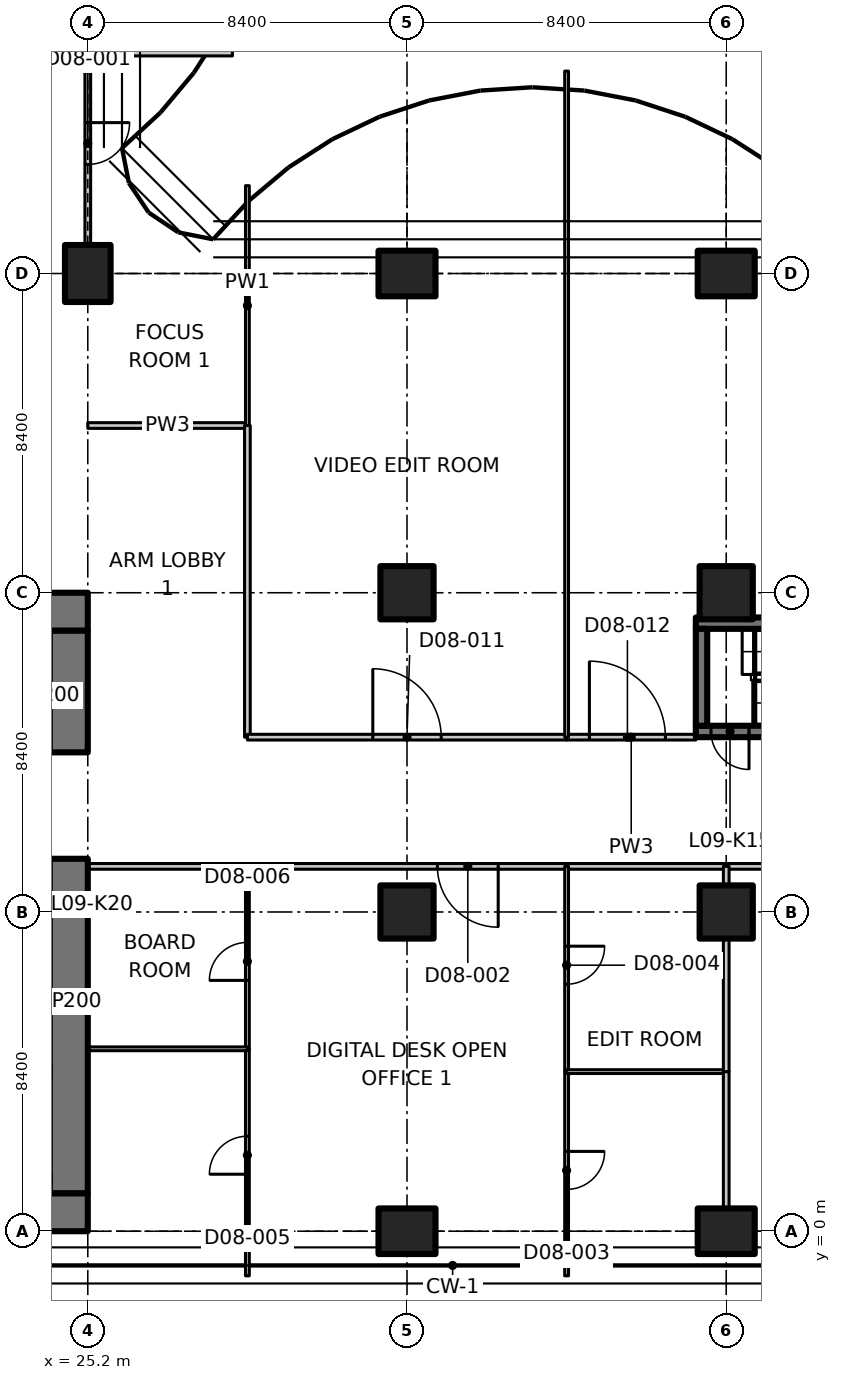
"""IFC4 building model, lengths in metres.
Left out: names, types, materials, properties, quantities, classifications, styles, units other than length and angle.
Written with IfcOpenShell. Run it as: python <this file> out.ifc"""

import sys

from ifc_helpers import new_model, si_unit, direction, frame, frame_2d, origin, origin_2d, place, context, subcontext, project, spatial, polyline, rectangle, outline, extrude, element, fill, save


model = new_model("IFC4")
c1 = context("Model", 3, precision=1e-05, world=origin(), true_north=direction((0.0, 1.0)))
c2 = subcontext(c1, "Body", "Model", "MODEL_VIEW")
j1 = project(units=[si_unit("LENGTHUNIT", "METRE"), si_unit("PLANEANGLEUNIT", "RADIAN")], contexts=[c1])
p1 = place(None, origin())
s1 = spatial("IfcSite", under=j1, at=p1, CompositionType="ELEMENT")
p2 = place(p1, origin())
s2 = spatial("IfcBuilding", under=s1, at=p2, CompositionType="ELEMENT")
p3 = place(p2, frame((0.0, 0.0, 47.3)))
s3 = spatial("IfcBuildingStorey", under=s2, at=p3, CompositionType="ELEMENT", Elevation=47.3)
for number, where, z_axis, x_axis in (
    (1, (25.2, 25.2, 0.0), (0.0, 0.0, 1.0), (1.0, 0.0, 0.0)),
    (2, (33.6, 0.0, 0.0), (0.0, 0.0, 1.0), (0.0, 1.0, 0.0)),
):
    element("IfcColumn", number, at=place(p3, frame(where, z_axis=z_axis, x_axis=x_axis)), inside=s3, PredefinedType="COLUMN", context=c2, shape_type="SweptSolid", body=[
        extrude(rectangle(XDim=1.2, YDim=1.5, at=origin_2d()), origin(), (0.0, 0.0, 1.0), 3.35),
    ])
for number, where, z_axis, x_axis in (
    (3, (33.6, 8.4, 0.0), (0.0, 0.0, 1.0), (1.0, 0.0, 0.0)),
    (4, (33.6, 16.8, 0.0), (0.0, 0.0, 1.0), (1.0, 0.0, 0.0)),
):
    element("IfcColumn", number, at=place(p3, frame(where, z_axis=z_axis, x_axis=x_axis)), inside=s3, PredefinedType="COLUMN", context=c2, shape_type="SweptSolid", body=[
        extrude(rectangle(XDim=1.4, YDim=1.4, at=origin_2d()), origin(), (0.0, 0.0, 1.0), 3.35),
    ])
for number, where, z_axis, x_axis in (
    (5, (33.6, 25.2, 0.0), (0.0, 0.0, 1.0), (0.0, 1.0, 0.0)),
    (6, (42.0, 0.0, 0.0), (0.0, 0.0, 1.0), (0.0, 1.0, 0.0)),
):
    element("IfcColumn", number, at=place(p3, frame(where, z_axis=z_axis, x_axis=x_axis)), inside=s3, PredefinedType="COLUMN", context=c2, shape_type="SweptSolid", body=[
        extrude(rectangle(XDim=1.2, YDim=1.5, at=origin_2d()), origin(), (0.0, 0.0, 1.0), 3.35),
    ])
for number, where, z_axis, x_axis in (
    (7, (42.0, 8.4, 0.0), (0.0, 0.0, 1.0), (1.0, 0.0, 0.0)),
    (8, (42.0, 16.8, 0.0), (0.0, 0.0, 1.0), (1.0, 0.0, 0.0)),
):
    element("IfcColumn", number, at=place(p3, frame(where, z_axis=z_axis, x_axis=x_axis)), inside=s3, PredefinedType="COLUMN", context=c2, shape_type="SweptSolid", body=[
        extrude(rectangle(XDim=1.4, YDim=1.4, at=origin_2d()), origin(), (0.0, 0.0, 1.0), 3.35),
    ])
p4 = place(p3, frame((42.0, 25.2, 0.0), z_axis=(0.0, 0.0, 1.0), x_axis=(0.0, 1.0, 0.0)))
e9 = element("IfcColumn", 9, at=p4, inside=s3, PredefinedType="COLUMN", context=c2, shape_type="SweptSolid", body=[
    extrude(rectangle(XDim=1.2, YDim=1.5, at=origin_2d()), origin(), (0.0, 0.0, 1.0), 3.35),
])
p5 = place(p3, frame((6.936, 0.5, 0.0), z_axis=(0.0, 0.0, 1.0), x_axis=(1.0, 0.0, 0.0)))
e10 = element("IfcWall", 10, at=p5, inside=s3, PredefinedType="SHEAR", context=c2, shape_type="SweptSolid", body=[
    extrude(rectangle(XDim=18.264, YDim=1.0, at=frame_2d((9.132, 0.0))), origin(), (0.0, 0.0, 1.0), 3.35),
])
p6 = place(p3, frame((23.8, 16.3, 0.0), z_axis=(0.0, 0.0, 1.0), x_axis=(1.0, 0.0, 0.0)))
e11 = element("IfcWall", 11, at=p6, inside=s3, PredefinedType="SHEAR", context=c2, shape_type="SweptSolid", body=[
    extrude(rectangle(XDim=1.4, YDim=1.0, at=frame_2d((0.7, 0.0))), origin(), (0.0, 0.0, 1.0), 3.35),
])
p7 = place(p3, frame((24.7, 1.0, 0.0), z_axis=(0.0, 0.0, 1.0), x_axis=(0.0, 1.0, 0.0)))
e12 = element("IfcWall", 12, at=p7, inside=s3, PredefinedType="SHEAR", context=c2, shape_type="SweptSolid", body=[
    extrude(rectangle(XDim=8.8, YDim=1.0, at=frame_2d((4.4, 0.0))), origin(), (0.0, 0.0, 1.0), 3.35),
])
p8 = place(p3, frame((24.7, 12.6, 0.0), z_axis=(0.0, 0.0, 1.0), x_axis=(0.0, 1.0, 0.0)))
e13 = element("IfcWall", 13, at=p8, inside=s3, PredefinedType="SHEAR", context=c2, shape_type="SweptSolid", body=[
    extrude(rectangle(XDim=3.2, YDim=1.0, at=frame_2d((1.6, 0.0))), origin(), (0.0, 0.0, 1.0), 3.35),
])
p9 = place(p3, frame((49.4, 13.15, 0.0), z_axis=(0.0, 0.0, 1.0), x_axis=(-1.0, 0.0, 0.0)))
e14 = element("IfcWall", 14, at=p9, inside=s3, PredefinedType="SHEAR", context=c2, shape_type="SweptSolid", body=[
    extrude(rectangle(XDim=8.2, YDim=0.3, at=frame_2d((4.1, 0.0))), origin(), (0.0, 0.0, 1.0), 3.35),
])
p10 = place(p9, frame((6.8, 0.0, 0.0)))
e15 = element("IfcOpeningElement", 15, at=p10, cuts=e14, PredefinedType="OPENING", context=c2, shape_type="SweptSolid", body=[
    extrude(rectangle(XDim=1.0, YDim=2.1, at=frame_2d((0.5, 1.05))), frame((0.0, 0.16, 0.0), z_axis=(0.0, -1.0, 0.0), x_axis=(1.0, 0.0, 0.0)), (0.0, 0.0, 1.0), 0.32),
])
p11 = place(p3, frame((41.2, 16.0, 0.0), z_axis=(0.0, 0.0, 1.0), x_axis=(1.0, 0.0, 0.0)))
e16 = element("IfcWall", 16, at=p11, inside=s3, PredefinedType="SHEAR", context=c2, shape_type="SweptSolid", body=[
    extrude(rectangle(XDim=8.2, YDim=0.3, at=frame_2d((4.1, 0.0))), origin(), (0.0, 0.0, 1.0), 3.35),
])
p12 = place(p3, frame((41.35, 13.3, 0.0), z_axis=(0.0, 0.0, 1.0), x_axis=(0.0, 1.0, 0.0)))
e17 = element("IfcWall", 17, at=p12, inside=s3, PredefinedType="SHEAR", context=c2, shape_type="SweptSolid", body=[
    extrude(rectangle(XDim=2.55, YDim=0.3, at=frame_2d((1.275, 0.0))), origin(), (0.0, 0.0, 1.0), 3.35),
])
for number, where, z_axis, x_axis in (
    (18, (25.2, 21.2, 0.0), (0.0, 0.0, 1.0), (1.0, 0.0, 0.0)),
    (19, (29.4, 9.6, 0.0), (0.0, 0.0, 1.0), (-1.0, 0.0, 0.0)),
):
    element("IfcWall", number, at=place(p3, frame(where, z_axis=z_axis, x_axis=x_axis)), inside=s3, PredefinedType="PARTITIONING", context=c2, shape_type="SweptSolid", body=[
        extrude(rectangle(XDim=4.2, YDim=0.15, at=frame_2d((2.1, 0.0))), origin(), (0.0, 0.0, 1.0), 3.33),
    ])
p13 = place(p3, frame((29.4, 21.2, 0.0), z_axis=(0.0, 0.0, 1.0), x_axis=(0.0, -1.0, 0.0)))
e20 = element("IfcWall", 20, at=p13, inside=s3, PredefinedType="PARTITIONING", context=c2, shape_type="SweptSolid", body=[
    extrude(rectangle(XDim=8.2, YDim=0.15, at=frame_2d((4.1, 0.0))), origin(), (0.0, 0.0, 1.0), 3.33),
])
p14 = place(p3, frame((29.4, 27.511, 0.0), z_axis=(0.0, 0.0, 1.0), x_axis=(0.0, -1.0, 0.0)))
e21 = element("IfcWall", 21, at=p14, inside=s3, PredefinedType="PARTITIONING", context=c2, shape_type="SweptSolid", body=[
    extrude(outline(polyline([(0.0, 0.0), (6.311, 0.0), (6.311, 3.33), (2.761, 3.33), (2.759, 2.98), (1.863, 2.98), (1.861, 3.33), (0.236, 3.33), (0.0, 3.33), (0.0, 0.0)])), frame((0.0, 0.05, 0.0), z_axis=(0.0, -1.0, 0.0), x_axis=(1.0, 0.0, 0.0)), (0.0, 0.0, 1.0), 0.1),
])
p15 = place(p3, frame((25.2, 31.0, 0.0), z_axis=(0.0, 0.0, 1.0), x_axis=(0.0, -1.0, 0.0)))
e22 = element("IfcWall", 22, at=p15, inside=s3, PredefinedType="PARTITIONING", context=c2, shape_type="SweptSolid", body=[
    extrude(outline(polyline([(0.0, 0.0), (5.03, 0.0), (5.03, 2.98), (0.0, 2.98), (0.0, 0.0)])), frame((0.0, 0.075, 0.0), z_axis=(0.0, -1.0, 0.0), x_axis=(1.0, 0.0, 0.0)), (0.0, 0.0, 1.0), 0.15),
])
p16 = place(p15, frame((1.83, 0.0, 0.0)))
e23 = element("IfcOpeningElement", 23, at=p16, cuts=e22, PredefinedType="OPENING", context=c2, shape_type="SweptSolid", body=[
    extrude(rectangle(XDim=1.1, YDim=2.1, at=frame_2d((0.55, 1.05))), frame((0.0, 0.085, 0.0), z_axis=(0.0, -1.0, 0.0), x_axis=(1.0, 0.0, 0.0)), (0.0, 0.0, 1.0), 0.17),
])
p17 = place(p3, frame((25.2, 31.0, 0.0), z_axis=(0.0, 0.0, 1.0), x_axis=(1.0, 0.0, 0.0)))
e24 = element("IfcWall", 24, at=p17, inside=s3, PredefinedType="PARTITIONING", context=c2, shape_type="SweptSolid", body=[
    extrude(rectangle(XDim=3.806, YDim=0.15, at=frame_2d((1.903, 0.0))), origin(), (0.0, 0.0, 1.0), 2.98),
])
p18 = place(p3, frame((37.8, 9.6, 0.0), z_axis=(0.0, 0.0, 1.0), x_axis=(-1.0, 0.0, 0.0)))
e25 = element("IfcWall", 25, at=p18, inside=s3, PredefinedType="PARTITIONING", context=c2, shape_type="SweptSolid", body=[
    extrude(rectangle(XDim=8.4, YDim=0.15, at=frame_2d((4.2, 0.0))), origin(), (0.0, 0.0, 1.0), 3.33),
])
p19 = place(p18, frame((1.8, 0.0, 0.0)))
e26 = element("IfcOpeningElement", 26, at=p19, cuts=e25, PredefinedType="OPENING", context=c2, shape_type="SweptSolid", body=[
    extrude(rectangle(XDim=1.6, YDim=2.1, at=frame_2d((0.8, 1.05))), frame((0.0, 0.085, 0.0), z_axis=(0.0, -1.0, 0.0), x_axis=(1.0, 0.0, 0.0)), (0.0, 0.0, 1.0), 0.17),
])
p20 = place(p3, frame((42.0, 9.6, 0.0), z_axis=(0.0, 0.0, 1.0), x_axis=(-1.0, 0.0, 0.0)))
e27 = element("IfcWall", 27, at=p20, inside=s3, PredefinedType="PARTITIONING", context=c2, shape_type="SweptSolid", body=[
    extrude(rectangle(XDim=4.2, YDim=0.15, at=frame_2d((2.1, 0.0))), origin(), (0.0, 0.0, 1.0), 3.33),
])
p21 = place(p3, frame((54.6, 9.6, 0.0), z_axis=(0.0, 0.0, 1.0), x_axis=(-1.0, 0.0, 0.0)))
e28 = element("IfcWall", 28, at=p21, inside=s3, PredefinedType="PARTITIONING", context=c2, shape_type="SweptSolid", body=[
    extrude(rectangle(XDim=12.6, YDim=0.15, at=frame_2d((6.3, 0.0))), origin(), (0.0, 0.0, 1.0), 3.33),
])
p22 = place(p21, frame((5.4, 0.0, 0.0)))
e29 = element("IfcOpeningElement", 29, at=p22, cuts=e28, PredefinedType="OPENING", context=c2, shape_type="SweptSolid", body=[
    extrude(rectangle(XDim=1.8, YDim=2.1, at=frame_2d((0.9, 1.05))), frame((0.0, 0.085, 0.0), z_axis=(0.0, -1.0, 0.0), x_axis=(1.0, 0.0, 0.0)), (0.0, 0.0, 1.0), 0.17),
])
p23 = place(p3, frame((29.4, 13.0, 0.0), z_axis=(0.0, 0.0, 1.0), x_axis=(1.0, 0.0, 0.0)))
e30 = element("IfcWall", 30, at=p23, inside=s3, PredefinedType="PARTITIONING", context=c2, shape_type="SweptSolid", body=[
    extrude(rectangle(XDim=8.4, YDim=0.15, at=frame_2d((4.2, 0.0))), origin(), (0.0, 0.0, 1.0), 3.33),
])
p24 = place(p23, frame((3.3, 0.0, 0.0)))
e31 = element("IfcOpeningElement", 31, at=p24, cuts=e30, PredefinedType="OPENING", context=c2, shape_type="SweptSolid", body=[
    extrude(rectangle(XDim=1.8, YDim=2.1, at=frame_2d((0.9, 1.05))), frame((0.0, 0.085, 0.0), z_axis=(0.0, -1.0, 0.0), x_axis=(1.0, 0.0, 0.0)), (0.0, 0.0, 1.0), 0.17),
])
p25 = place(p3, frame((37.8, 13.0, 0.0), z_axis=(0.0, 0.0, 1.0), x_axis=(1.0, 0.0, 0.0)))
e32 = element("IfcWall", 32, at=p25, inside=s3, PredefinedType="PARTITIONING", context=c2, shape_type="SweptSolid", body=[
    extrude(rectangle(XDim=3.4, YDim=0.15, at=frame_2d((1.7, 0.0))), origin(), (0.0, 0.0, 1.0), 3.33),
])
p26 = place(p25, frame((0.6, 0.0, 0.0)))
e33 = element("IfcOpeningElement", 33, at=p26, cuts=e32, PredefinedType="OPENING", context=c2, shape_type="SweptSolid", body=[
    extrude(rectangle(XDim=2.0, YDim=2.4, at=frame_2d((1.0, 1.2))), frame((0.0, 0.085, 0.0), z_axis=(0.0, -1.0, 0.0), x_axis=(1.0, 0.0, 0.0)), (0.0, 0.0, 1.0), 0.17),
])
p27 = place(p3, frame((37.8, 4.2, 0.0), z_axis=(0.0, 0.0, 1.0), x_axis=(0.0, -1.0, 0.0)))
e34 = element("IfcWall", 34, at=p27, inside=s3, PredefinedType="PARTITIONING", context=c2, shape_type="SweptSolid", body=[
    extrude(outline(polyline([(0.0, 0.0), (5.374, 0.0), (5.374, 3.33), (5.3, 3.33), (4.65, 3.33), (4.648, 2.98), (3.752, 2.98), (3.75, 3.33), (0.0, 3.33), (0.0, 0.0)])), frame((0.0, 0.05, 0.0), z_axis=(0.0, -1.0, 0.0), x_axis=(1.0, 0.0, 0.0)), (0.0, 0.0, 1.0), 0.1),
])
p28 = place(p27, frame((2.1, 0.0, 0.0)))
e35 = element("IfcOpeningElement", 35, at=p28, cuts=e34, PredefinedType="OPENING", context=c2, shape_type="SweptSolid", body=[
    extrude(rectangle(XDim=1.0, YDim=2.1, at=frame_2d((0.5, 1.05))), frame((0.0, 0.06, 0.0), z_axis=(0.0, -1.0, 0.0), x_axis=(1.0, 0.0, 0.0)), (0.0, 0.0, 1.0), 0.12),
])
p29 = place(p3, frame((37.8, 9.6, 0.0), z_axis=(0.0, 0.0, 1.0), x_axis=(0.0, -1.0, 0.0)))
e36 = element("IfcWall", 36, at=p29, inside=s3, PredefinedType="PARTITIONING", context=c2, shape_type="SweptSolid", body=[
    extrude(rectangle(XDim=5.4, YDim=0.1, at=frame_2d((2.7, 0.0))), origin(), (0.0, 0.0, 1.0), 3.33),
])
p30 = place(p29, frame((2.1, 0.0, 0.0)))
e37 = element("IfcOpeningElement", 37, at=p30, cuts=e36, PredefinedType="OPENING", context=c2, shape_type="SweptSolid", body=[
    extrude(rectangle(XDim=1.0, YDim=2.1, at=frame_2d((0.5, 1.05))), frame((0.0, 0.06, 0.0), z_axis=(0.0, -1.0, 0.0), x_axis=(1.0, 0.0, 0.0)), (0.0, 0.0, 1.0), 0.12),
])
p31 = place(p3, frame((29.4, -1.174, 0.0), z_axis=(0.0, 0.0, 1.0), x_axis=(0.0, 1.0, 0.0)))
e38 = element("IfcWall", 38, at=p31, inside=s3, PredefinedType="PARTITIONING", context=c2, shape_type="SweptSolid", body=[
    extrude(outline(polyline([(0.0, 0.0), (5.974, 0.0), (5.974, 3.33), (1.624, 3.33), (1.622, 2.98), (0.726, 2.98), (0.724, 3.33), (0.074, 3.33), (0.0, 3.33), (0.0, 0.0)])), frame((0.0, 0.05, 0.0), z_axis=(0.0, -1.0, 0.0), x_axis=(1.0, 0.0, 0.0)), (0.0, 0.0, 1.0), 0.1),
])
p32 = place(p31, frame((2.674, 0.0, 0.0)))
e39 = element("IfcOpeningElement", 39, at=p32, cuts=e38, PredefinedType="OPENING", context=c2, shape_type="SweptSolid", body=[
    extrude(rectangle(XDim=1.0, YDim=2.1, at=frame_2d((0.5, 1.05))), frame((0.0, 0.06, 0.0), z_axis=(0.0, -1.0, 0.0), x_axis=(1.0, 0.0, 0.0)), (0.0, 0.0, 1.0), 0.12),
])
p33 = place(p3, frame((29.4, 4.8, 0.0), z_axis=(0.0, 0.0, 1.0), x_axis=(0.0, 1.0, 0.0)))
e40 = element("IfcWall", 40, at=p33, inside=s3, PredefinedType="PARTITIONING", context=c2, shape_type="SweptSolid", body=[
    extrude(rectangle(XDim=4.8, YDim=0.1, at=frame_2d((2.4, 0.0))), origin(), (0.0, 0.0, 1.0), 3.33),
])
p34 = place(p33, frame((1.8, 0.0, 0.0)))
e41 = element("IfcOpeningElement", 41, at=p34, cuts=e40, PredefinedType="OPENING", context=c2, shape_type="SweptSolid", body=[
    extrude(rectangle(XDim=1.0, YDim=2.1, at=frame_2d((0.5, 1.05))), frame((0.0, 0.06, 0.0), z_axis=(0.0, -1.0, 0.0), x_axis=(1.0, 0.0, 0.0)), (0.0, 0.0, 1.0), 0.12),
])
p35 = place(p3, frame((37.8, 4.2, 0.0), z_axis=(0.0, 0.0, 1.0), x_axis=(1.0, 0.0, 0.0)))
e42 = element("IfcWall", 42, at=p35, inside=s3, PredefinedType="PARTITIONING", context=c2, shape_type="SweptSolid", body=[
    extrude(rectangle(XDim=4.2, YDim=0.1, at=frame_2d((2.1, 0.0))), origin(), (0.0, 0.0, 1.0), 3.33),
])
p36 = place(p3, frame((42.0, 4.2, 0.0), z_axis=(0.0, 0.0, 1.0), x_axis=(0.0, -1.0, 0.0)))
e43 = element("IfcWall", 43, at=p36, inside=s3, PredefinedType="PARTITIONING", context=c2, shape_type="SweptSolid", body=[
    extrude(rectangle(XDim=3.58, YDim=0.15, at=frame_2d((1.79, 0.0))), origin(), (0.0, 0.0, 1.0), 3.33),
])
p37 = place(p3, frame((42.0, 9.6, 0.0), z_axis=(0.0, 0.0, 1.0), x_axis=(0.0, -1.0, 0.0)))
e44 = element("IfcWall", 44, at=p37, inside=s3, PredefinedType="PARTITIONING", context=c2, shape_type="SweptSolid", body=[
    extrude(rectangle(XDim=0.48, YDim=0.15, at=frame_2d((0.24, 0.0))), origin(), (0.0, 0.0, 1.0), 3.33),
])
p38 = place(p3, frame((42.0, 7.68, 0.0), z_axis=(0.0, 0.0, 1.0), x_axis=(0.0, -1.0, 0.0)))
e45 = element("IfcWall", 45, at=p38, inside=s3, PredefinedType="PARTITIONING", context=c2, shape_type="SweptSolid", body=[
    extrude(rectangle(XDim=3.48, YDim=0.15, at=frame_2d((1.74, 0.0))), origin(), (0.0, 0.0, 1.0), 3.33),
])
p39 = place(p3, frame((25.2, 4.8, 0.0), z_axis=(0.0, 0.0, 1.0), x_axis=(1.0, 0.0, 0.0)))
e46 = element("IfcWall", 46, at=p39, inside=s3, PredefinedType="PARTITIONING", context=c2, shape_type="SweptSolid", body=[
    extrude(rectangle(XDim=4.2, YDim=0.1, at=frame_2d((2.1, 0.0))), origin(), (0.0, 0.0, 1.0), 3.33),
])
p40 = place(p3, frame((37.8, 30.526, 0.0), z_axis=(0.0, 0.0, 1.0), x_axis=(0.0, -1.0, 0.0)))
e47 = element("IfcWall", 47, at=p40, inside=s3, PredefinedType="PARTITIONING", context=c2, shape_type="SweptSolid", body=[
    extrude(outline(polyline([(0.0, 0.0), (17.526, 0.0), (17.526, 3.33), (5.776, 3.33), (5.774, 2.98), (4.878, 2.98), (4.876, 3.33), (0.283, 3.33), (0.0, 3.33), (0.0, 0.0)])), frame((0.0, 0.05, 0.0), z_axis=(0.0, -1.0, 0.0), x_axis=(1.0, 0.0, 0.0)), (0.0, 0.0, 1.0), 0.1),
])
p41 = place(p10, origin())
e48 = element("IfcDoor", 48, at=p41, inside=s3, OperationType="SINGLE_SWING_RIGHT", PredefinedType="DOOR", context=c2, shape_type="SweptSolid", body=[
    extrude(rectangle(XDim=1.0, YDim=2.1, at=frame_2d((0.5, 1.05))), frame((0.0, 0.025, 0.0), z_axis=(0.0, -1.0, 0.0), x_axis=(1.0, 0.0, 0.0)), (0.0, 0.0, 1.0), 0.05),
])
fill(e15, e48)
p42 = place(p16, origin())
e49 = element("IfcDoor", 49, at=p42, inside=s3, OperationType="SINGLE_SWING_RIGHT", PredefinedType="DOOR", context=c2, shape_type="SweptSolid", body=[
    extrude(rectangle(XDim=1.1, YDim=2.1, at=frame_2d((0.55, 1.05))), frame((0.0, 0.025, 0.0), z_axis=(0.0, -1.0, 0.0), x_axis=(1.0, 0.0, 0.0)), (0.0, 0.0, 1.0), 0.05),
])
fill(e23, e49)
p43 = place(p19, origin())
e50 = element("IfcDoor", 50, at=p43, inside=s3, OperationType="DOUBLE_DOOR_SINGLE_SWING", PredefinedType="DOOR", context=c2, shape_type="SweptSolid", body=[
    extrude(rectangle(XDim=1.6, YDim=2.1, at=frame_2d((0.8, 1.05))), frame((0.0, 0.025, 0.0), z_axis=(0.0, -1.0, 0.0), x_axis=(1.0, 0.0, 0.0)), (0.0, 0.0, 1.0), 0.05),
])
fill(e26, e50)
p44 = place(p28, origin())
e51 = element("IfcDoor", 51, at=p44, inside=s3, OperationType="SINGLE_SWING_LEFT", PredefinedType="DOOR", context=c2, shape_type="SweptSolid", body=[
    extrude(rectangle(XDim=1.0, YDim=2.1, at=frame_2d((0.5, 1.05))), frame((0.0, 0.025, 0.0), z_axis=(0.0, -1.0, 0.0), x_axis=(1.0, 0.0, 0.0)), (0.0, 0.0, 1.0), 0.05),
])
fill(e35, e51)
p45 = place(p30, origin())
e52 = element("IfcDoor", 52, at=p45, inside=s3, OperationType="SINGLE_SWING_LEFT", PredefinedType="DOOR", context=c2, shape_type="SweptSolid", body=[
    extrude(rectangle(XDim=1.0, YDim=2.1, at=frame_2d((0.5, 1.05))), frame((0.0, 0.025, 0.0), z_axis=(0.0, -1.0, 0.0), x_axis=(1.0, 0.0, 0.0)), (0.0, 0.0, 1.0), 0.05),
])
fill(e37, e52)
p46 = place(p32, origin())
e53 = element("IfcDoor", 53, at=p46, inside=s3, OperationType="SINGLE_SWING_LEFT", PredefinedType="DOOR", context=c2, shape_type="SweptSolid", body=[
    extrude(rectangle(XDim=1.0, YDim=2.1, at=frame_2d((0.5, 1.05))), frame((0.0, 0.025, 0.0), z_axis=(0.0, -1.0, 0.0), x_axis=(1.0, 0.0, 0.0)), (0.0, 0.0, 1.0), 0.05),
])
fill(e39, e53)
p47 = place(p34, origin())
e54 = element("IfcDoor", 54, at=p47, inside=s3, OperationType="SINGLE_SWING_LEFT", PredefinedType="DOOR", context=c2, shape_type="SweptSolid", body=[
    extrude(rectangle(XDim=1.0, YDim=2.1, at=frame_2d((0.5, 1.05))), frame((0.0, 0.025, 0.0), z_axis=(0.0, -1.0, 0.0), x_axis=(1.0, 0.0, 0.0)), (0.0, 0.0, 1.0), 0.05),
])
fill(e41, e54)
p48 = place(p24, origin())
e55 = element("IfcDoor", 55, at=p48, inside=s3, OperationType="DOUBLE_DOOR_SINGLE_SWING", PredefinedType="DOOR", context=c2, shape_type="SweptSolid", body=[
    extrude(rectangle(XDim=1.8, YDim=2.1, at=frame_2d((0.9, 1.05))), frame((0.0, 0.025, 0.0), z_axis=(0.0, -1.0, 0.0), x_axis=(1.0, 0.0, 0.0)), (0.0, 0.0, 1.0), 0.05),
])
fill(e31, e55)
p49 = place(p26, origin())
e56 = element("IfcDoor", 56, at=p49, inside=s3, OperationType="DOUBLE_DOOR_SINGLE_SWING", PredefinedType="DOOR", context=c2, shape_type="SweptSolid", body=[
    extrude(rectangle(XDim=2.0, YDim=2.4, at=frame_2d((1.0, 1.2))), frame((0.0, 0.025, 0.0), z_axis=(0.0, -1.0, 0.0), x_axis=(1.0, 0.0, 0.0)), (0.0, 0.0, 1.0), 0.05),
])
fill(e33, e56)
save(model, sys.argv[1])
